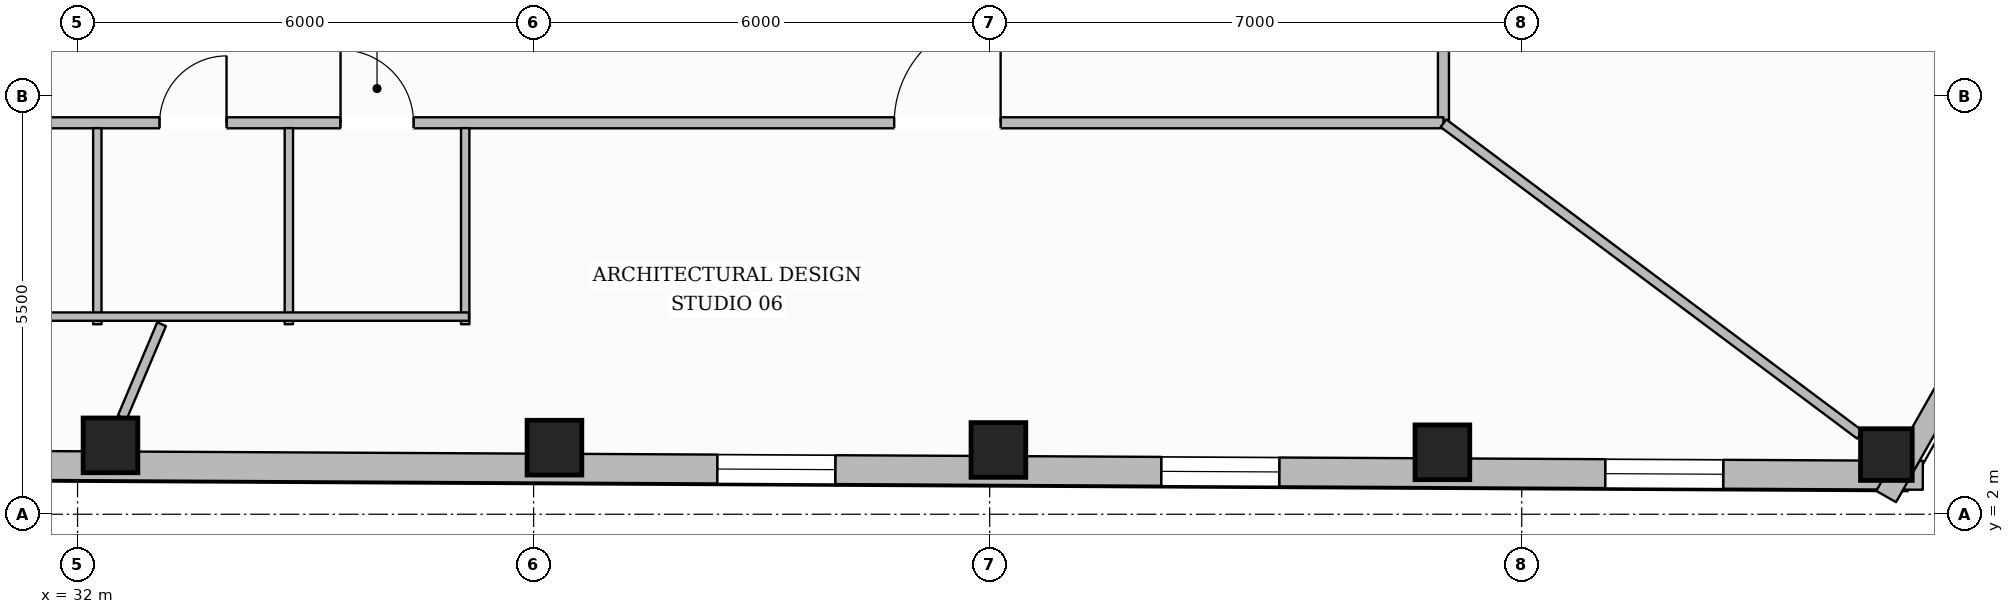
"""IFC4 building model, lengths in metres.
Left out: names, types, materials, properties, quantities, classifications, styles, units other than length and angle.
Written with IfcOpenShell. Run it as: python <this file> out.ifc"""

import sys

from ifc_helpers import new_model, si_unit, direction, frame, frame_2d, origin, origin_2d, place, context, subcontext, project, spatial, rectangle, hollow_rectangle, extrude, element, fill, save


model = new_model("IFC4")
c1 = context("Model", 3, precision=1e-05, world=origin(), true_north=direction((0.0, 1.0)))
c2 = subcontext(c1, "Body", "Model", "MODEL_VIEW")
j1 = project(units=[si_unit("LENGTHUNIT", "METRE"), si_unit("PLANEANGLEUNIT", "RADIAN")], contexts=[c1])
p1 = place(None, origin())
s1 = spatial("IfcSite", under=j1, at=p1, CompositionType="ELEMENT")
p2 = place(p1, origin())
s2 = spatial("IfcBuilding", under=s1, at=p2, CompositionType="ELEMENT")
p3 = place(p2, frame((0.0, 0.0, 108.6)))
s3 = spatial("IfcBuildingStorey", under=s2, at=p3, CompositionType="ELEMENT", Elevation=108.6)
for number, where, z_axis, x_axis in (
    (1, (32.433, 2.906, 0.0), (0.0, 0.0, 1.0), (1.0, 0.0, 0.0)),
    (2, (38.274, 2.876, 0.0), (0.0, 0.0, 1.0), (1.0, 0.0, 0.0)),
    (3, (44.115, 2.845, 0.0), (0.0, 0.0, 1.0), (1.0, 0.0, 0.0)),
    (4, (49.956, 2.815, 0.0), (0.0, 0.0, 1.0), (1.0, 0.0, 0.0)),
):
    element("IfcColumn", number, at=place(p3, frame(where, z_axis=z_axis, x_axis=x_axis)), inside=s3, PredefinedType="COLUMN", context=c2, shape_type="SweptSolid", body=[
        extrude(hollow_rectangle(XDim=0.72, YDim=0.72, WallThickness=0.032, at=origin_2d()), origin(), (0.0, 0.0, 1.0), 3.6),
    ])
p4 = place(p3, frame((55.797, 2.785, 0.0), z_axis=(0.0, 0.0, 1.0), x_axis=(1.0, 0.0, 0.0)))
e5 = element("IfcColumn", 5, at=p4, inside=s3, PredefinedType="COLUMN", context=c2, shape_type="SweptSolid", body=[
    extrude(hollow_rectangle(XDim=0.68, YDim=0.68, WallThickness=0.03, at=origin_2d()), origin(), (0.0, 0.0, 1.0), 3.6),
])
p5 = place(p3, frame((56.277, 2.512, 0.0), z_axis=(0.0, 0.0, 1.0), x_axis=(-0.999986545033, 0.005187461141, 0.0)))
e6 = element("IfcWall", 6, at=p5, inside=s3, PredefinedType="STANDARD", context=c2, shape_type="SweptSolid", body=[
    extrude(rectangle(XDim=36.004, YDim=0.38, at=frame_2d((18.002, 0.0))), origin(), (0.0, 0.0, 1.0), 3.059),
])
p6 = place(p5, frame((31.832, 0.0, 0.65)))
e7 = element("IfcOpeningElement", 7, at=p6, cuts=e6, PredefinedType="OPENING", context=c2, shape_type="SweptSolid", body=[
    extrude(rectangle(XDim=1.55, YDim=1.75, at=frame_2d((0.775, 0.875))), frame((0.0, 0.2, 0.0), z_axis=(0.0, -1.0, 0.0), x_axis=(1.0, 0.0, 0.0)), (0.0, 0.0, 1.0), 0.4),
])
p7 = place(p5, frame((25.991, 0.0, 0.65)))
e8 = element("IfcOpeningElement", 8, at=p7, cuts=e6, PredefinedType="OPENING", context=c2, shape_type="SweptSolid", body=[
    extrude(rectangle(XDim=1.55, YDim=1.75, at=frame_2d((0.775, 0.875))), frame((0.0, 0.2, 0.0), z_axis=(0.0, -1.0, 0.0), x_axis=(1.0, 0.0, 0.0)), (0.0, 0.0, 1.0), 0.4),
])
p8 = place(p5, frame((14.309, 0.0, 0.65)))
e9 = element("IfcOpeningElement", 9, at=p8, cuts=e6, PredefinedType="OPENING", context=c2, shape_type="SweptSolid", body=[
    extrude(rectangle(XDim=1.55, YDim=1.75, at=frame_2d((0.775, 0.875))), frame((0.0, 0.2, 0.0), z_axis=(0.0, -1.0, 0.0), x_axis=(1.0, 0.0, 0.0)), (0.0, 0.0, 1.0), 0.4),
])
p9 = place(p5, frame((8.468, 0.0, 0.65)))
e10 = element("IfcOpeningElement", 10, at=p9, cuts=e6, PredefinedType="OPENING", context=c2, shape_type="SweptSolid", body=[
    extrude(rectangle(XDim=1.55, YDim=1.75, at=frame_2d((0.775, 0.875))), frame((0.0, 0.2, 0.0), z_axis=(0.0, -1.0, 0.0), x_axis=(1.0, 0.0, 0.0)), (0.0, 0.0, 1.0), 0.4),
])
p10 = place(p5, frame((2.627, 0.0, 0.65)))
e11 = element("IfcOpeningElement", 11, at=p10, cuts=e6, PredefinedType="OPENING", context=c2, shape_type="SweptSolid", body=[
    extrude(rectangle(XDim=1.55, YDim=1.75, at=frame_2d((0.775, 0.875))), frame((0.0, 0.2, 0.0), z_axis=(0.0, -1.0, 0.0), x_axis=(1.0, 0.0, 0.0)), (0.0, 0.0, 1.0), 0.4),
])
p11 = place(p3, frame((62.28, 13.652, 0.0), z_axis=(0.0, 0.0, 1.0), x_axis=(-0.493862788891, -0.869539847131, 0.0)))
e12 = element("IfcWall", 12, at=p11, inside=s3, PredefinedType="STANDARD", context=c2, shape_type="SweptSolid", body=[
    extrude(rectangle(XDim=13.132, YDim=0.3, at=frame_2d((6.566, 0.0))), origin(), (0.0, 0.0, 1.0), 3.059),
])
p12 = place(p11, frame((5.966, 0.0, 0.65)))
e13 = element("IfcOpeningElement", 13, at=p12, cuts=e12, PredefinedType="OPENING", context=c2, shape_type="SweptSolid", body=[
    extrude(rectangle(XDim=1.2, YDim=1.7, at=frame_2d((0.6, 0.85))), frame((0.0, 0.16, 0.0), z_axis=(0.0, -1.0, 0.0), x_axis=(1.0, 0.0, 0.0)), (0.0, 0.0, 1.0), 0.32),
])
p13 = place(p3, frame((49.97, 7.15, 0.0), z_axis=(0.0, 0.0, 1.0), x_axis=(0.0, 1.0, 0.0)))
e14 = element("IfcWall", 14, at=p13, inside=s3, PredefinedType="PARTITIONING", context=c2, shape_type="SweptSolid", body=[
    extrude(rectangle(XDim=17.9, YDim=0.145, at=frame_2d((8.95, 0.0))), origin(), (0.0, 0.0, 1.0), 3.288),
])
p14 = place(p13, frame((8.25, 0.0, 0.0)))
e15 = element("IfcOpeningElement", 15, at=p14, cuts=e14, PredefinedType="OPENING", context=c2, shape_type="SweptSolid", body=[
    extrude(rectangle(XDim=1.4, YDim=2.2, at=frame_2d((0.7, 1.1))), frame((0.0, 0.083, 0.0), z_axis=(0.0, -1.0, 0.0), x_axis=(1.0, 0.0, 0.0)), (0.0, 0.0, 1.0), 0.165),
])
p15 = place(p3, frame((26.03, 7.15, 0.0), z_axis=(0.0, 0.0, 1.0), x_axis=(1.0, 0.0, 0.0)))
e16 = element("IfcWall", 16, at=p15, inside=s3, PredefinedType="PARTITIONING", context=c2, shape_type="SweptSolid", body=[
    extrude(rectangle(XDim=23.94, YDim=0.145, at=frame_2d((11.97, 0.0))), origin(), (0.0, 0.0, 1.0), 3.6),
])
p16 = place(p15, frame((4.53, 0.0, 0.0)))
e17 = element("IfcOpeningElement", 17, at=p16, cuts=e16, PredefinedType="OPENING", context=c2, shape_type="SweptSolid", body=[
    extrude(rectangle(XDim=0.88, YDim=2.1, at=frame_2d((0.44, 1.05))), frame((0.0, 0.083, 0.0), z_axis=(0.0, -1.0, 0.0), x_axis=(1.0, 0.0, 0.0)), (0.0, 0.0, 1.0), 0.165),
])
p17 = place(p15, frame((7.05, 0.0, 0.0)))
e18 = element("IfcOpeningElement", 18, at=p17, cuts=e16, PredefinedType="OPENING", context=c2, shape_type="SweptSolid", body=[
    extrude(rectangle(XDim=0.88, YDim=2.1, at=frame_2d((0.44, 1.05))), frame((0.0, 0.083, 0.0), z_axis=(0.0, -1.0, 0.0), x_axis=(1.0, 0.0, 0.0)), (0.0, 0.0, 1.0), 0.165),
])
p18 = place(p15, frame((9.43, 0.0, 0.0)))
e19 = element("IfcOpeningElement", 19, at=p18, cuts=e16, PredefinedType="OPENING", context=c2, shape_type="SweptSolid", body=[
    extrude(rectangle(XDim=0.96, YDim=2.1, at=frame_2d((0.48, 1.05))), frame((0.0, 0.083, 0.0), z_axis=(0.0, -1.0, 0.0), x_axis=(1.0, 0.0, 0.0)), (0.0, 0.0, 1.0), 0.165),
])
p19 = place(p15, frame((1.456, 0.0, 0.0)))
e20 = element("IfcOpeningElement", 20, at=p19, cuts=e16, PredefinedType="OPENING", context=c2, shape_type="SweptSolid", body=[
    extrude(rectangle(XDim=0.98, YDim=2.15, at=frame_2d((0.49, 1.075))), frame((0.0, 0.083, 0.0), z_axis=(0.0, -1.0, 0.0), x_axis=(1.0, 0.0, 0.0)), (0.0, 0.0, 1.0), 0.165),
])
p20 = place(p15, frame((16.714, 0.0, 0.0)))
e21 = element("IfcOpeningElement", 21, at=p20, cuts=e16, PredefinedType="OPENING", context=c2, shape_type="SweptSolid", body=[
    extrude(rectangle(XDim=1.4, YDim=2.2, at=frame_2d((0.7, 1.1))), frame((0.0, 0.083, 0.0), z_axis=(0.0, -1.0, 0.0), x_axis=(1.0, 0.0, 0.0)), (0.0, 0.0, 1.0), 0.165),
])
p21 = place(p3, frame((32.26, 4.5, 0.0), z_axis=(0.0, 0.0, 1.0), x_axis=(0.0, 1.0, 0.0)))
e22 = element("IfcWall", 22, at=p21, inside=s3, PredefinedType="PLUMBINGWALL", context=c2, shape_type="SweptSolid", body=[
    extrude(rectangle(XDim=2.58, YDim=0.11, at=frame_2d((1.29, 0.0))), origin(), (0.0, 0.0, 1.0), 3.141),
])
for number, where, z_axis, x_axis in (
    (23, (34.78, 4.5, 0.0), (0.0, 0.0, 1.0), (0.0, 1.0, 0.0)),
    (24, (37.1, 4.5, 0.0), (0.0, 0.0, 1.0), (0.0, 1.0, 0.0)),
):
    element("IfcWall", number, at=place(p3, frame(where, z_axis=z_axis, x_axis=x_axis)), inside=s3, PredefinedType="PLUMBINGWALL", context=c2, shape_type="SweptSolid", body=[
        extrude(rectangle(XDim=2.58, YDim=0.11, at=frame_2d((1.29, 0.0))), origin(), (0.0, 0.0, 1.0), 3.6),
    ])
p22 = place(p3, frame((29.69, 4.6, 0.0), z_axis=(0.0, 0.0, 1.0), x_axis=(1.0, 0.0, 0.0)))
e25 = element("IfcWall", 25, at=p22, inside=s3, PredefinedType="PLUMBINGWALL", context=c2, shape_type="SweptSolid", body=[
    extrude(rectangle(XDim=7.46, YDim=0.11, at=frame_2d((3.73, 0.0))), origin(), (0.0, 0.0, 1.0), 3.6),
])
p23 = place(p3, frame((33.106, 4.5, 0.0), z_axis=(0.0, 0.0, 1.0), x_axis=(-0.388819762507, -0.921313840276, 0.0)))
e26 = element("IfcWall", 26, at=p23, inside=s3, PredefinedType="PARTITIONING", context=c2, shape_type="SweptSolid", body=[
    extrude(rectangle(XDim=1.331, YDim=0.125, at=frame_2d((0.665, 0.0))), origin(), (0.0, 0.0, 1.0), 3.6),
])
p24 = place(p3, frame((49.97, 7.145, 0.0), z_axis=(0.0, 0.0, 1.0), x_axis=(0.800705856265, -0.599057703183, 0.0)))
e27 = element("IfcWall", 27, at=p24, inside=s3, PredefinedType="PARTITIONING", context=c2, shape_type="SweptSolid", body=[
    extrude(rectangle(XDim=6.843, YDim=0.125, at=frame_2d((3.421, 0.0))), origin(), (0.0, 0.0, 1.0), 3.141),
])
p25 = place(p8, origin())
e28 = element("IfcWindow", 28, at=p25, inside=s3, PartitioningType="SINGLE_PANEL", PredefinedType="WINDOW", context=c2, shape_type="SweptSolid", body=[
    extrude(rectangle(XDim=1.55, YDim=1.75, at=frame_2d((0.775, 0.875))), frame((0.0, 0.03, 0.0), z_axis=(0.0, -1.0, 0.0), x_axis=(1.0, 0.0, 0.0)), (0.0, 0.0, 1.0), 0.06),
])
fill(e9, e28)
p26 = place(p9, origin())
e29 = element("IfcWindow", 29, at=p26, inside=s3, PartitioningType="SINGLE_PANEL", PredefinedType="WINDOW", context=c2, shape_type="SweptSolid", body=[
    extrude(rectangle(XDim=1.55, YDim=1.75, at=frame_2d((0.775, 0.875))), frame((0.0, 0.03, 0.0), z_axis=(0.0, -1.0, 0.0), x_axis=(1.0, 0.0, 0.0)), (0.0, 0.0, 1.0), 0.06),
])
fill(e10, e29)
p27 = place(p10, origin())
e30 = element("IfcWindow", 30, at=p27, inside=s3, PartitioningType="SINGLE_PANEL", PredefinedType="WINDOW", context=c2, shape_type="SweptSolid", body=[
    extrude(rectangle(XDim=1.55, YDim=1.75, at=frame_2d((0.775, 0.875))), frame((0.0, 0.03, 0.0), z_axis=(0.0, -1.0, 0.0), x_axis=(1.0, 0.0, 0.0)), (0.0, 0.0, 1.0), 0.06),
])
fill(e11, e30)
p28 = place(p17, origin())
e31 = element("IfcDoor", 31, at=p28, inside=s3, OperationType="SINGLE_SWING_RIGHT", PredefinedType="DOOR", context=c2, shape_type="SweptSolid", body=[
    extrude(rectangle(XDim=0.88, YDim=2.1, at=frame_2d((0.44, 1.05))), frame((0.0, 0.025, 0.0), z_axis=(0.0, -1.0, 0.0), x_axis=(1.0, 0.0, 0.0)), (0.0, 0.0, 1.0), 0.05),
])
fill(e18, e31)
p29 = place(p18, origin())
e32 = element("IfcDoor", 32, at=p29, inside=s3, OperationType="SINGLE_SWING_LEFT", PredefinedType="DOOR", context=c2, shape_type="SweptSolid", body=[
    extrude(rectangle(XDim=0.96, YDim=2.1, at=frame_2d((0.48, 1.05))), frame((0.0, 0.025, 0.0), z_axis=(0.0, -1.0, 0.0), x_axis=(1.0, 0.0, 0.0)), (0.0, 0.0, 1.0), 0.05),
])
fill(e19, e32)
p30 = place(p20, origin())
e33 = element("IfcDoor", 33, at=p30, inside=s3, OperationType="SINGLE_SWING_RIGHT", PredefinedType="DOOR", context=c2, shape_type="SweptSolid", body=[
    extrude(rectangle(XDim=1.4, YDim=2.2, at=frame_2d((0.7, 1.1))), frame((0.0, 0.025, 0.0), z_axis=(0.0, -1.0, 0.0), x_axis=(1.0, 0.0, 0.0)), (0.0, 0.0, 1.0), 0.05),
])
fill(e21, e33)
save(model, sys.argv[1])
